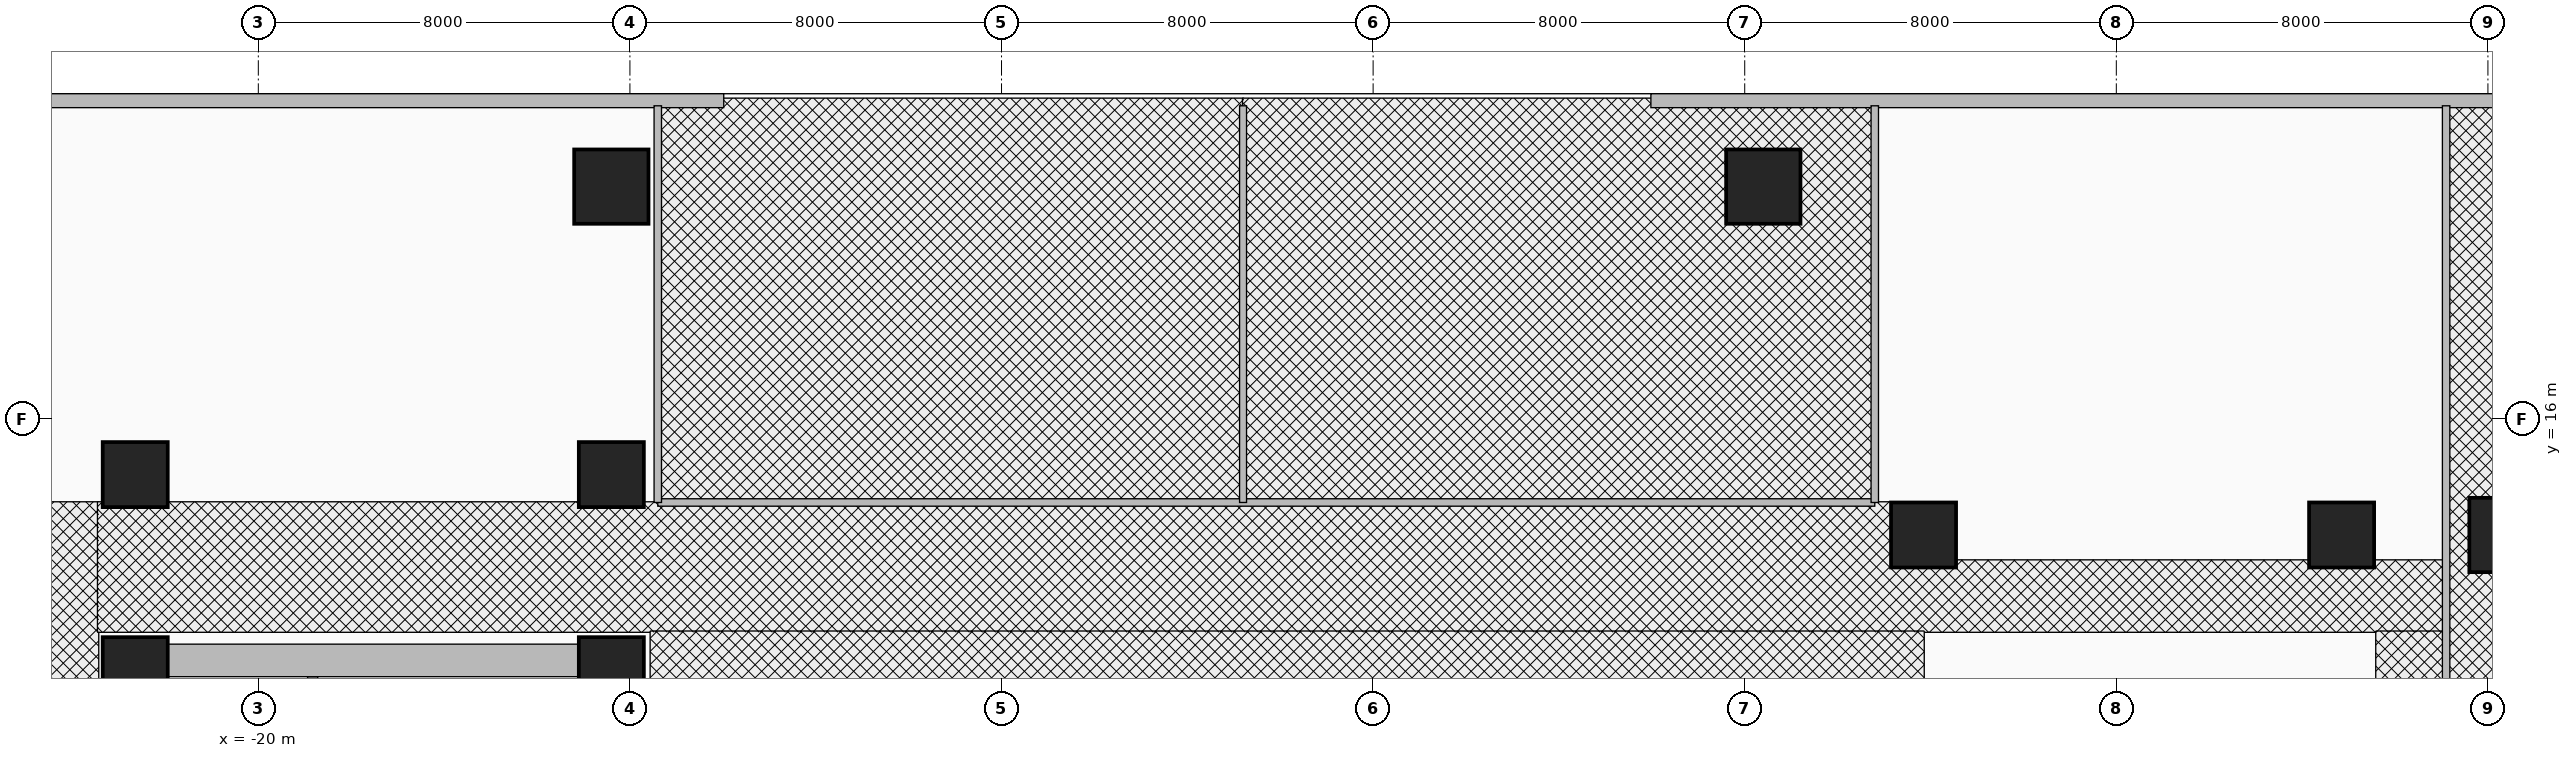
"""IFC4 building model, lengths in metres.
Left out: names, types, materials, properties, quantities, classifications, styles, units other than length and angle.
Written with IfcOpenShell. Run it as: python <this file> out.ifc"""

import sys

from ifc_helpers import new_model, si_unit, direction, frame, frame_2d, origin, origin_2d, place, context, subcontext, project, spatial, rectangle, extrude, source, transform, mapped, element, fill, save


model = new_model("IFC4")
c1 = context("Model", 3, precision=1e-05, world=origin(), true_north=direction((0.0, 1.0)))
c2 = subcontext(c1, "Body", "Model", "MODEL_VIEW")
j1 = project(units=[si_unit("LENGTHUNIT", "METRE"), si_unit("PLANEANGLEUNIT", "RADIAN")], contexts=[c1])
p1 = place(None, origin())
s1 = spatial("IfcSite", under=j1, at=p1, CompositionType="ELEMENT")
p2 = place(p1, origin())
s2 = spatial("IfcBuilding", under=s1, at=p2, CompositionType="ELEMENT")
p3 = place(p2, frame((0.0, 0.0, 5.2)))
s3 = spatial("IfcBuildingStorey", under=s2, at=p3, CompositionType="ELEMENT", Elevation=5.2)
for number, where, z_axis, x_axis in (
    (1, (-22.16, 1.78, 0.0), (0.0, 0.0, 1.0), (0.0, 1.0, 0.0)),
    (2, (-18.83, 1.78, 0.0), (0.0, 0.0, 1.0), (0.0, 1.0, 0.0)),
):
    element("IfcWall", number, at=place(p3, frame(where, z_axis=z_axis, x_axis=x_axis)), inside=s3, PredefinedType="SHEAR", context=c2, shape_type="SweptSolid", body=[
        extrude(rectangle(XDim=8.67, YDim=0.22, at=frame_2d((4.335, 0.0))), origin(), (0.0, 0.0, 1.0), 4.92),
    ])
p4 = place(p3, frame((-22.65, -11.15, 0.0), z_axis=(0.0, 0.0, 1.0), x_axis=(0.0, 1.0, 0.0)))
e3 = element("IfcWall", 3, at=p4, inside=s3, PredefinedType="SHEAR", context=c2, shape_type="SweptSolid", body=[
    extrude(rectangle(XDim=22.3, YDim=0.7, at=frame_2d((11.15, 0.0))), origin(), (0.0, 0.0, 1.0), 4.92),
])
p5 = place(p3, frame((-22.65, 10.8, 0.0), z_axis=(0.0, 0.0, 1.0), x_axis=(1.0, 0.0, 0.0)))
e4 = element("IfcWall", 4, at=p5, inside=s3, PredefinedType="SHEAR", context=c2, shape_type="SweptSolid", body=[
    extrude(rectangle(XDim=10.25, YDim=0.7, at=frame_2d((5.125, 0.0))), origin(), (0.0, 0.0, 1.0), 4.92),
])
m1 = source(origin(), c2, "Body", "SweptSolid", [
    extrude(rectangle(XDim=1.4, YDim=1.4, at=origin_2d()), origin(), (0.0, 0.0, 1.0), 5.2),
])
for number, where, z_axis, x_axis in (
    (5, (-22.65, 10.6, 0.0), (0.0, 0.0, 1.0), (1.0, 0.0, 0.0)),
    (6, (-12.4, 10.6, 0.0), (0.0, 0.0, 1.0), (1.0, 0.0, 0.0)),
    (7, (-22.65, 14.8, 0.0), (0.0, 0.0, 1.0), (1.0, 0.0, 0.0)),
    (8, (-12.4, 14.8, 0.0), (0.0, 0.0, 1.0), (1.0, 0.0, 0.0)),
    (9, (15.85, 13.5, 0.0), (0.0, 0.0, 1.0), (1.0, 0.0, 0.0)),
    (10, (24.85, 13.5, 0.0), (0.0, 0.0, 1.0), (1.0, 0.0, 0.0)),
):
    element("IfcColumn", number, at=place(p3, frame(where, z_axis=z_axis, x_axis=x_axis)), inside=s3, PredefinedType="COLUMN", context=c2, shape_type="MappedRepresentation", body=[
        mapped(m1, transform((0.0, 0.0, 0.0), x_axis=(1.0, 0.0, 0.0), y_axis=(0.0, 1.0, 0.0), z_axis=(0.0, 0.0, 1.0), scale=1.0)),
    ])
m2 = source(origin(), c2, "Body", "SweptSolid", [
    extrude(rectangle(XDim=1.6, YDim=1.6, at=origin_2d()), origin(), (0.0, 0.0, 1.0), 5.2),
])
for number, where, z_axis, x_axis in (
    (11, (28.4, 13.5, 0.0), (0.0, 0.0, 1.0), (1.0, 0.0, 0.0)),
    (12, (-12.4, 21.0, 0.0), (0.0, 0.0, 1.0), (1.0, 0.0, 0.0)),
    (13, (12.4, 21.0, 0.0), (0.0, 0.0, 1.0), (1.0, 0.0, 0.0)),
):
    element("IfcColumn", number, at=place(p3, frame(where, z_axis=z_axis, x_axis=x_axis)), inside=s3, PredefinedType="COLUMN", context=c2, shape_type="MappedRepresentation", body=[
        mapped(m2, transform((0.0, 0.0, 0.0), x_axis=(1.0, 0.0, 0.0), y_axis=(0.0, 1.0, 0.0), z_axis=(0.0, 0.0, 1.0), scale=1.0)),
    ])
p6 = place(p3, frame((-33.85, 22.85, 0.0), z_axis=(0.0, 0.0, 1.0), x_axis=(1.0, 0.0, 0.0)))
e14 = element("IfcWall", 14, at=p6, inside=s3, PredefinedType="SOLIDWALL", context=c2, shape_type="SweptSolid", body=[
    extrude(rectangle(XDim=23.87, YDim=0.3, at=frame_2d((11.935, 0.0))), origin(), (0.0, 0.0, 1.0), 4.92),
])
p7 = place(p6, frame((3.2, 0.0, 0.9)))
e15 = element("IfcOpeningElement", 15, at=p7, cuts=e14, PredefinedType="OPENING", context=c2, shape_type="SweptSolid", body=[
    extrude(rectangle(XDim=1.5, YDim=1.75, at=frame_2d((0.75, 0.875))), frame((0.0, 0.165, 0.0), z_axis=(0.0, -1.0, 0.0), x_axis=(1.0, 0.0, 0.0)), (0.0, 0.0, 1.0), 0.33),
])
p8 = place(p6, frame((10.0, 0.0, 0.9)))
e16 = element("IfcOpeningElement", 16, at=p8, cuts=e14, PredefinedType="OPENING", context=c2, shape_type="SweptSolid", body=[
    extrude(rectangle(XDim=1.5, YDim=1.75, at=frame_2d((0.75, 0.875))), frame((0.0, 0.165, 0.0), z_axis=(0.0, -1.0, 0.0), x_axis=(1.0, 0.0, 0.0)), (0.0, 0.0, 1.0), 0.33),
])
p9 = place(p6, frame((17.8, 0.0, 0.9)))
e17 = element("IfcOpeningElement", 17, at=p9, cuts=e14, PredefinedType="OPENING", context=c2, shape_type="SweptSolid", body=[
    extrude(rectangle(XDim=1.5, YDim=1.75, at=frame_2d((0.75, 0.875))), frame((0.0, 0.165, 0.0), z_axis=(0.0, -1.0, 0.0), x_axis=(1.0, 0.0, 0.0)), (0.0, 0.0, 1.0), 0.33),
])
p10 = place(p3, frame((9.98, 22.85, 0.0), z_axis=(0.0, 0.0, 1.0), x_axis=(1.0, 0.0, 0.0)))
e18 = element("IfcWall", 18, at=p10, inside=s3, PredefinedType="SOLIDWALL", context=c2, shape_type="SweptSolid", body=[
    extrude(rectangle(XDim=23.87, YDim=0.3, at=frame_2d((11.935, 0.0))), origin(), (0.0, 0.0, 1.0), 4.92),
])
p11 = place(p10, frame((3.2, 0.0, 0.9)))
e19 = element("IfcOpeningElement", 19, at=p11, cuts=e18, PredefinedType="OPENING", context=c2, shape_type="SweptSolid", body=[
    extrude(rectangle(XDim=1.5, YDim=1.75, at=frame_2d((0.75, 0.875))), frame((0.0, 0.165, 0.0), z_axis=(0.0, -1.0, 0.0), x_axis=(1.0, 0.0, 0.0)), (0.0, 0.0, 1.0), 0.33),
])
p12 = place(p10, frame((10.0, 0.0, 0.9)))
e20 = element("IfcOpeningElement", 20, at=p12, cuts=e18, PredefinedType="OPENING", context=c2, shape_type="SweptSolid", body=[
    extrude(rectangle(XDim=1.5, YDim=1.75, at=frame_2d((0.75, 0.875))), frame((0.0, 0.165, 0.0), z_axis=(0.0, -1.0, 0.0), x_axis=(1.0, 0.0, 0.0)), (0.0, 0.0, 1.0), 0.33),
])
p13 = place(p10, frame((17.8, 0.0, 0.9)))
e21 = element("IfcOpeningElement", 21, at=p13, cuts=e18, PredefinedType="OPENING", context=c2, shape_type="SweptSolid", body=[
    extrude(rectangle(XDim=1.5, YDim=1.75, at=frame_2d((0.75, 0.875))), frame((0.0, 0.165, 0.0), z_axis=(0.0, -1.0, 0.0), x_axis=(1.0, 0.0, 0.0)), (0.0, 0.0, 1.0), 0.33),
])
p14 = place(p3, frame((-11.4, 14.2, 0.0), z_axis=(0.0, 0.0, 1.0), x_axis=(1.0, 0.0, 0.0)))
e22 = element("IfcWall", 22, at=p14, inside=s3, PredefinedType="PARTITIONING", context=c2, shape_type="SweptSolid", body=[
    extrude(rectangle(XDim=26.2, YDim=0.16, at=frame_2d((13.1, 0.0))), origin(), (0.0, 0.0, 1.0), 4.92),
])
p15 = place(p14, frame((4.5, 0.0, 0.0)))
e23 = element("IfcOpeningElement", 23, at=p15, cuts=e22, PredefinedType="OPENING", context=c2, shape_type="SweptSolid", body=[
    extrude(rectangle(XDim=1.8, YDim=2.15, at=frame_2d((0.9, 1.075))), frame((0.0, 0.095, 0.0), z_axis=(0.0, -1.0, 0.0), x_axis=(1.0, 0.0, 0.0)), (0.0, 0.0, 1.0), 0.19),
])
p16 = place(p14, frame((17.5, 0.0, 0.0)))
e24 = element("IfcOpeningElement", 24, at=p16, cuts=e22, PredefinedType="OPENING", context=c2, shape_type="SweptSolid", body=[
    extrude(rectangle(XDim=1.8, YDim=2.15, at=frame_2d((0.9, 1.075))), frame((0.0, 0.095, 0.0), z_axis=(0.0, -1.0, 0.0), x_axis=(1.0, 0.0, 0.0)), (0.0, 0.0, 1.0), 0.19),
])
for number, where, z_axis, x_axis in (
    (25, (-11.4, 14.2, 0.0), (0.0, 0.0, 1.0), (0.0, 1.0, 0.0)),
    (26, (14.8, 14.2, 0.0), (0.0, 0.0, 1.0), (0.0, 1.0, 0.0)),
):
    element("IfcWall", number, at=place(p3, frame(where, z_axis=z_axis, x_axis=x_axis)), inside=s3, PredefinedType="PARTITIONING", context=c2, shape_type="SweptSolid", body=[
        extrude(rectangle(XDim=8.54, YDim=0.16, at=frame_2d((4.27, 0.0))), origin(), (0.0, 0.0, 1.0), 3.957),
    ])
p17 = place(p3, frame((1.2, 14.2, 0.0), z_axis=(0.0, 0.0, 1.0), x_axis=(0.0, 1.0, 0.0)))
e27 = element("IfcWall", 27, at=p17, inside=s3, PredefinedType="PARTITIONING", context=c2, shape_type="SweptSolid", body=[
    extrude(rectangle(XDim=8.54, YDim=0.15, at=frame_2d((4.27, 0.0))), origin(), (0.0, 0.0, 1.0), 3.957),
])
p18 = place(p3, frame((27.1, -22.74, 0.0), z_axis=(0.0, 0.0, 1.0), x_axis=(0.0, 1.0, 0.0)))
e28 = element("IfcWall", 28, at=p18, inside=s3, PredefinedType="PARTITIONING", context=c2, shape_type="SweptSolid", body=[
    extrude(rectangle(XDim=45.48, YDim=0.16, at=frame_2d((22.74, 0.0))), origin(), (0.0, 0.0, 1.0), 3.957),
])
p19 = place(p18, frame((7.0, 0.0, 0.0)))
e29 = element("IfcOpeningElement", 29, at=p19, cuts=e28, PredefinedType="OPENING", context=c2, shape_type="SweptSolid", body=[
    extrude(rectangle(XDim=1.8, YDim=2.15, at=frame_2d((0.9, 1.075))), frame((0.0, 0.095, 0.0), z_axis=(0.0, -1.0, 0.0), x_axis=(1.0, 0.0, 0.0)), (0.0, 0.0, 1.0), 0.19),
])
p20 = place(p18, frame((25.0, 0.0, 0.0)))
e30 = element("IfcOpeningElement", 30, at=p20, cuts=e28, PredefinedType="OPENING", context=c2, shape_type="SweptSolid", body=[
    extrude(rectangle(XDim=1.8, YDim=2.15, at=frame_2d((0.9, 1.075))), frame((0.0, 0.095, 0.0), z_axis=(0.0, -1.0, 0.0), x_axis=(1.0, 0.0, 0.0)), (0.0, 0.0, 1.0), 0.19),
])
p21 = place(p8, origin())
e31 = element("IfcWindow", 31, at=p21, inside=s3, PartitioningType="SINGLE_PANEL", PredefinedType="WINDOW", context=c2, shape_type="SweptSolid", body=[
    extrude(rectangle(XDim=1.5, YDim=1.75, at=frame_2d((0.75, 0.875))), frame((0.0, 0.03, 0.0), z_axis=(0.0, -1.0, 0.0), x_axis=(1.0, 0.0, 0.0)), (0.0, 0.0, 1.0), 0.06),
])
fill(e16, e31)
p22 = place(p9, origin())
e32 = element("IfcWindow", 32, at=p22, inside=s3, PartitioningType="SINGLE_PANEL", PredefinedType="WINDOW", context=c2, shape_type="SweptSolid", body=[
    extrude(rectangle(XDim=1.5, YDim=1.75, at=frame_2d((0.75, 0.875))), frame((0.0, 0.03, 0.0), z_axis=(0.0, -1.0, 0.0), x_axis=(1.0, 0.0, 0.0)), (0.0, 0.0, 1.0), 0.06),
])
fill(e17, e32)
p23 = place(p11, origin())
e33 = element("IfcWindow", 33, at=p23, inside=s3, PartitioningType="SINGLE_PANEL", PredefinedType="WINDOW", context=c2, shape_type="SweptSolid", body=[
    extrude(rectangle(XDim=1.5, YDim=1.75, at=frame_2d((0.75, 0.875))), frame((0.0, 0.03, 0.0), z_axis=(0.0, -1.0, 0.0), x_axis=(1.0, 0.0, 0.0)), (0.0, 0.0, 1.0), 0.06),
])
fill(e19, e33)
p24 = place(p12, origin())
e34 = element("IfcWindow", 34, at=p24, inside=s3, PartitioningType="SINGLE_PANEL", PredefinedType="WINDOW", context=c2, shape_type="SweptSolid", body=[
    extrude(rectangle(XDim=1.5, YDim=1.75, at=frame_2d((0.75, 0.875))), frame((0.0, 0.03, 0.0), z_axis=(0.0, -1.0, 0.0), x_axis=(1.0, 0.0, 0.0)), (0.0, 0.0, 1.0), 0.06),
])
fill(e20, e34)
p25 = place(p13, origin())
e35 = element("IfcWindow", 35, at=p25, inside=s3, PartitioningType="SINGLE_PANEL", PredefinedType="WINDOW", context=c2, shape_type="SweptSolid", body=[
    extrude(rectangle(XDim=1.5, YDim=1.75, at=frame_2d((0.75, 0.875))), frame((0.0, 0.03, 0.0), z_axis=(0.0, -1.0, 0.0), x_axis=(1.0, 0.0, 0.0)), (0.0, 0.0, 1.0), 0.06),
])
fill(e21, e35)
p26 = place(p15, origin())
e36 = element("IfcDoor", 36, at=p26, inside=s3, OperationType="DOUBLE_DOOR_SINGLE_SWING", PredefinedType="DOOR", context=c2, shape_type="SweptSolid", body=[
    extrude(rectangle(XDim=1.8, YDim=2.15, at=frame_2d((0.9, 1.075))), frame((0.0, 0.025, 0.0), z_axis=(0.0, -1.0, 0.0), x_axis=(1.0, 0.0, 0.0)), (0.0, 0.0, 1.0), 0.05),
])
fill(e23, e36)
p27 = place(p16, frame((1.8, 0.0, 0.0), z_axis=(0.0, 0.0, 1.0), x_axis=(-1.0, 0.0, 0.0)))
e37 = element("IfcDoor", 37, at=p27, inside=s3, OperationType="DOUBLE_DOOR_SINGLE_SWING", PredefinedType="DOOR", context=c2, shape_type="SweptSolid", body=[
    extrude(rectangle(XDim=1.8, YDim=2.15, at=frame_2d((0.9, 1.075))), frame((0.0, 0.025, 0.0), z_axis=(0.0, -1.0, 0.0), x_axis=(1.0, 0.0, 0.0)), (0.0, 0.0, 1.0), 0.05),
])
fill(e24, e37)
save(model, sys.argv[1])
